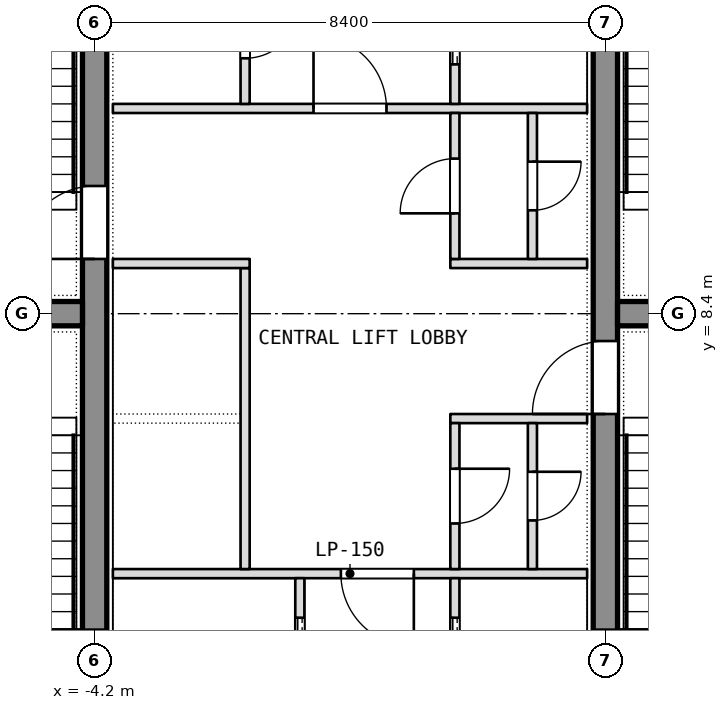
"""IFC4 building model, lengths in metres.
Left out: names, types, materials, properties, quantities, classifications, styles, units other than length and angle.
Written with IfcOpenShell. Run it as: python <this file> out.ifc"""

import sys

from ifc_helpers import new_model, si_unit, direction, frame, frame_2d, origin, place, context, subcontext, project, spatial, rectangle, extrude, element, fill, save


model = new_model("IFC4")
c1 = context("Model", 3, precision=1e-05, world=origin(), true_north=direction((0.0, 1.0)))
c2 = subcontext(c1, "Body", "Model", "MODEL_VIEW")
j1 = project(units=[si_unit("LENGTHUNIT", "METRE"), si_unit("PLANEANGLEUNIT", "RADIAN")], contexts=[c1])
p1 = place(None, origin())
s1 = spatial("IfcSite", under=j1, at=p1, CompositionType="ELEMENT")
p2 = place(p1, origin())
s2 = spatial("IfcBuilding", under=s1, at=p2, CompositionType="ELEMENT")
p3 = place(p2, frame((0.0, 0.0, 198.5)))
s3 = spatial("IfcBuildingStorey", under=s2, at=p3, CompositionType="ELEMENT", Elevation=198.5)
p4 = place(p3, frame((-4.2, 0.8, 0.0), z_axis=(0.0, 0.0, 1.0), x_axis=(0.0, 1.0, 0.0)))
e1 = element("IfcWall", 1, at=p4, inside=s3, PredefinedType="SHEAR", context=c2, shape_type="SweptSolid", body=[
    extrude(rectangle(XDim=15.2, YDim=0.4, at=frame_2d((7.6, 0.0))), origin(), (0.0, 0.0, 1.0), 3.6),
])
p5 = place(p4, frame((8.5, 0.0, 0.0)))
e2 = element("IfcOpeningElement", 2, at=p5, cuts=e1, PredefinedType="OPENING", context=c2, shape_type="SweptSolid", body=[
    extrude(rectangle(XDim=1.2, YDim=2.1, at=frame_2d((0.6, 1.05))), frame((0.0, 0.2, 0.0), z_axis=(0.0, -1.0, 0.0), x_axis=(1.0, 0.0, 0.0)), (0.0, 0.0, 1.0), 0.4),
])
p6 = place(p3, frame((4.2, 0.8, 0.0), z_axis=(0.0, 0.0, 1.0), x_axis=(0.0, 1.0, 0.0)))
e3 = element("IfcWall", 3, at=p6, inside=s3, PredefinedType="SHEAR", context=c2, shape_type="SweptSolid", body=[
    extrude(rectangle(XDim=15.2, YDim=0.4, at=frame_2d((7.6, 0.0))), origin(), (0.0, 0.0, 1.0), 3.6),
])
p7 = place(p6, frame((5.95, 0.0, 0.0)))
e4 = element("IfcOpeningElement", 4, at=p7, cuts=e3, PredefinedType="OPENING", context=c2, shape_type="SweptSolid", body=[
    extrude(rectangle(XDim=1.2, YDim=2.1, at=frame_2d((0.6, 1.05))), frame((0.0, 0.2, 0.0), z_axis=(0.0, -1.0, 0.0), x_axis=(1.0, 0.0, 0.0)), (0.0, 0.0, 1.0), 0.4),
])
for number, where, z_axis, x_axis in (
    (5, (-11.1, 8.4, 0.0), (0.0, 0.0, 1.0), (1.0, 0.0, 0.0)),
    (6, (4.4, 8.4, 0.0), (0.0, 0.0, 1.0), (1.0, 0.0, 0.0)),
):
    element("IfcWall", number, at=place(p3, frame(where, z_axis=z_axis, x_axis=x_axis)), inside=s3, PredefinedType="SHEAR", context=c2, shape_type="SweptSolid", body=[
        extrude(rectangle(XDim=6.7, YDim=0.4, at=frame_2d((3.35, 0.0))), origin(), (0.0, 0.0, 1.0), 3.6),
    ])
p8 = place(p3, frame((-3.9, 4.125, 0.0), z_axis=(0.0, 0.0, 1.0), x_axis=(1.0, 0.0, 0.0)))
e7 = element("IfcWall", 7, at=p8, inside=s3, PredefinedType="PARTITIONING", context=c2, shape_type="SweptSolid", body=[
    extrude(rectangle(XDim=7.8, YDim=0.15, at=frame_2d((3.9, 0.0))), origin(), (0.0, 0.0, 1.0), 3.34),
])
p9 = place(p8, frame((3.75, 0.0, 0.0)))
e8 = element("IfcOpeningElement", 8, at=p9, cuts=e7, PredefinedType="OPENING", context=c2, shape_type="SweptSolid", body=[
    extrude(rectangle(XDim=1.2, YDim=2.1, at=frame_2d((0.6, 1.05))), frame((0.0, 0.075, 0.0), z_axis=(0.0, -1.0, 0.0), x_axis=(1.0, 0.0, 0.0)), (0.0, 0.0, 1.0), 0.15),
])
p10 = place(p3, frame((-3.9, 11.775, 0.0), z_axis=(0.0, 0.0, 1.0), x_axis=(1.0, 0.0, 0.0)))
e9 = element("IfcWall", 9, at=p10, inside=s3, PredefinedType="PARTITIONING", context=c2, shape_type="SweptSolid", body=[
    extrude(rectangle(XDim=7.8, YDim=0.15, at=frame_2d((3.9, 0.0))), origin(), (0.0, 0.0, 1.0), 3.34),
])
p11 = place(p10, frame((3.3, 0.0, 0.0)))
e10 = element("IfcOpeningElement", 10, at=p11, cuts=e9, PredefinedType="OPENING", context=c2, shape_type="SweptSolid", body=[
    extrude(rectangle(XDim=1.2, YDim=2.1, at=frame_2d((0.6, 1.05))), frame((0.0, 0.075, 0.0), z_axis=(0.0, -1.0, 0.0), x_axis=(1.0, 0.0, 0.0)), (0.0, 0.0, 1.0), 0.15),
])
p12 = place(p3, frame((-0.825, 1.5, 0.0), z_axis=(0.0, 0.0, 1.0), x_axis=(0.0, 1.0, 0.0)))
e11 = element("IfcWall", 11, at=p12, inside=s3, PredefinedType="SHEAR", context=c2, shape_type="SweptSolid", body=[
    extrude(rectangle(XDim=2.55, YDim=0.15, at=frame_2d((1.275, 0.0))), origin(), (0.0, 0.0, 1.0), 3.6),
])
p13 = place(p12, frame((0.8, 0.0, 0.0)))
e12 = element("IfcOpeningElement", 12, at=p13, cuts=e11, PredefinedType="OPENING", context=c2, shape_type="SweptSolid", body=[
    extrude(rectangle(XDim=1.1, YDim=2.1, at=frame_2d((0.55, 1.05))), frame((0.0, 0.075, 0.0), z_axis=(0.0, -1.0, 0.0), x_axis=(1.0, 0.0, 0.0)), (0.0, 0.0, 1.0), 0.15),
])
p14 = place(p3, frame((-1.725, 4.2, 0.0), z_axis=(0.0, 0.0, 1.0), x_axis=(0.0, 1.0, 0.0)))
e13 = element("IfcWall", 13, at=p14, inside=s3, PredefinedType="SHEAR", context=c2, shape_type="SweptSolid", body=[
    extrude(rectangle(XDim=4.95, YDim=0.15, at=frame_2d((2.475, 0.0))), origin(), (0.0, 0.0, 1.0), 3.6),
])
p15 = place(p3, frame((-3.9, 9.225, 0.0), z_axis=(0.0, 0.0, 1.0), x_axis=(1.0, 0.0, 0.0)))
e14 = element("IfcWall", 14, at=p15, inside=s3, PredefinedType="SHEAR", context=c2, shape_type="SweptSolid", body=[
    extrude(rectangle(XDim=2.25, YDim=0.15, at=frame_2d((1.125, 0.0))), origin(), (0.0, 0.0, 1.0), 3.6),
])
p16 = place(p3, frame((-1.725, 11.85, 0.0), z_axis=(0.0, 0.0, 1.0), x_axis=(0.0, 1.0, 0.0)))
e15 = element("IfcWall", 15, at=p16, inside=s3, PredefinedType="PARTITIONING", context=c2, shape_type="SweptSolid", body=[
    extrude(rectangle(XDim=2.4, YDim=0.15, at=frame_2d((1.2, 0.0))), origin(), (0.0, 0.0, 1.0), 3.34),
])
p17 = place(p16, frame((0.75, 0.0, 0.0)))
e16 = element("IfcOpeningElement", 16, at=p17, cuts=e15, PredefinedType="OPENING", context=c2, shape_type="SweptSolid", body=[
    extrude(rectangle(XDim=0.9, YDim=2.1, at=frame_2d((0.45, 1.05))), frame((0.0, 0.075, 0.0), z_axis=(0.0, -1.0, 0.0), x_axis=(1.0, 0.0, 0.0)), (0.0, 0.0, 1.0), 0.15),
])
p18 = place(p3, frame((1.725, 1.65, 0.0), z_axis=(0.0, 0.0, 1.0), x_axis=(0.0, 1.0, 0.0)))
e17 = element("IfcWall", 17, at=p18, inside=s3, PredefinedType="SHEAR", context=c2, shape_type="SweptSolid", body=[
    extrude(rectangle(XDim=2.4, YDim=0.15, at=frame_2d((1.2, 0.0))), origin(), (0.0, 0.0, 1.0), 3.6),
])
p19 = place(p18, frame((0.65, 0.0, 0.0)))
e18 = element("IfcOpeningElement", 18, at=p19, cuts=e17, PredefinedType="OPENING", context=c2, shape_type="SweptSolid", body=[
    extrude(rectangle(XDim=1.1, YDim=2.1, at=frame_2d((0.55, 1.05))), frame((0.0, 0.075, 0.0), z_axis=(0.0, -1.0, 0.0), x_axis=(1.0, 0.0, 0.0)), (0.0, 0.0, 1.0), 0.15),
])
p20 = place(p3, frame((1.725, 11.85, 0.0), z_axis=(0.0, 0.0, 1.0), x_axis=(0.0, 1.0, 0.0)))
e19 = element("IfcWall", 19, at=p20, inside=s3, PredefinedType="SHEAR", context=c2, shape_type="SweptSolid", body=[
    extrude(rectangle(XDim=2.4, YDim=0.15, at=frame_2d((1.2, 0.0))), origin(), (0.0, 0.0, 1.0), 3.6),
])
p21 = place(p20, frame((0.65, 0.0, 0.0)))
e20 = element("IfcOpeningElement", 20, at=p21, cuts=e19, PredefinedType="OPENING", context=c2, shape_type="SweptSolid", body=[
    extrude(rectangle(XDim=1.1, YDim=2.1, at=frame_2d((0.55, 1.05))), frame((0.0, 0.075, 0.0), z_axis=(0.0, -1.0, 0.0), x_axis=(1.0, 0.0, 0.0)), (0.0, 0.0, 1.0), 0.15),
])
for number, where, z_axis, x_axis in (
    (21, (1.65, 6.675, 0.0), (0.0, 0.0, 1.0), (1.0, 0.0, 0.0)),
    (22, (1.65, 9.225, 0.0), (0.0, 0.0, 1.0), (1.0, 0.0, 0.0)),
):
    element("IfcWall", number, at=place(p3, frame(where, z_axis=z_axis, x_axis=x_axis)), inside=s3, PredefinedType="PARTITIONING", context=c2, shape_type="SweptSolid", body=[
        extrude(rectangle(XDim=2.25, YDim=0.15, at=frame_2d((1.125, 0.0))), origin(), (0.0, 0.0, 1.0), 3.34),
    ])
p22 = place(p3, frame((1.725, 4.2, 0.0), z_axis=(0.0, 0.0, 1.0), x_axis=(0.0, 1.0, 0.0)))
e23 = element("IfcWall", 23, at=p22, inside=s3, PredefinedType="PARTITIONING", context=c2, shape_type="SweptSolid", body=[
    extrude(rectangle(XDim=2.4, YDim=0.15, at=frame_2d((1.2, 0.0))), origin(), (0.0, 0.0, 1.0), 3.34),
])
p23 = place(p22, frame((0.75, 0.0, 0.0)))
e24 = element("IfcOpeningElement", 24, at=p23, cuts=e23, PredefinedType="OPENING", context=c2, shape_type="SweptSolid", body=[
    extrude(rectangle(XDim=0.9, YDim=2.1, at=frame_2d((0.45, 1.05))), frame((0.0, 0.075, 0.0), z_axis=(0.0, -1.0, 0.0), x_axis=(1.0, 0.0, 0.0)), (0.0, 0.0, 1.0), 0.15),
])
p24 = place(p3, frame((1.725, 9.3, 0.0), z_axis=(0.0, 0.0, 1.0), x_axis=(0.0, 1.0, 0.0)))
e25 = element("IfcWall", 25, at=p24, inside=s3, PredefinedType="PARTITIONING", context=c2, shape_type="SweptSolid", body=[
    extrude(rectangle(XDim=2.4, YDim=0.15, at=frame_2d((1.2, 0.0))), origin(), (0.0, 0.0, 1.0), 3.34),
])
p25 = place(p24, frame((0.75, 0.0, 0.0)))
e26 = element("IfcOpeningElement", 26, at=p25, cuts=e25, PredefinedType="OPENING", context=c2, shape_type="SweptSolid", body=[
    extrude(rectangle(XDim=0.9, YDim=2.1, at=frame_2d((0.45, 1.05))), frame((0.0, 0.075, 0.0), z_axis=(0.0, -1.0, 0.0), x_axis=(1.0, 0.0, 0.0)), (0.0, 0.0, 1.0), 0.15),
])
p26 = place(p3, frame((3.0, 4.2, 0.0), z_axis=(0.0, 0.0, 1.0), x_axis=(0.0, 1.0, 0.0)))
e27 = element("IfcWall", 27, at=p26, inside=s3, PredefinedType="PARTITIONING", context=c2, shape_type="SweptSolid", body=[
    extrude(rectangle(XDim=2.4, YDim=0.15, at=frame_2d((1.2, 0.0))), origin(), (0.0, 0.0, 1.0), 3.34),
])
p27 = place(p26, frame((0.8, 0.0, 0.0)))
e28 = element("IfcOpeningElement", 28, at=p27, cuts=e27, PredefinedType="OPENING", context=c2, shape_type="SweptSolid", body=[
    extrude(rectangle(XDim=0.8, YDim=2.1, at=frame_2d((0.4, 1.05))), frame((0.0, 0.075, 0.0), z_axis=(0.0, -1.0, 0.0), x_axis=(1.0, 0.0, 0.0)), (0.0, 0.0, 1.0), 0.15),
])
p28 = place(p3, frame((3.0, 9.3, 0.0), z_axis=(0.0, 0.0, 1.0), x_axis=(0.0, 1.0, 0.0)))
e29 = element("IfcWall", 29, at=p28, inside=s3, PredefinedType="PARTITIONING", context=c2, shape_type="SweptSolid", body=[
    extrude(rectangle(XDim=2.4, YDim=0.15, at=frame_2d((1.2, 0.0))), origin(), (0.0, 0.0, 1.0), 3.34),
])
p29 = place(p28, frame((0.8, 0.0, 0.0)))
e30 = element("IfcOpeningElement", 30, at=p29, cuts=e29, PredefinedType="OPENING", context=c2, shape_type="SweptSolid", body=[
    extrude(rectangle(XDim=0.8, YDim=2.1, at=frame_2d((0.4, 1.05))), frame((0.0, 0.075, 0.0), z_axis=(0.0, -1.0, 0.0), x_axis=(1.0, 0.0, 0.0)), (0.0, 0.0, 1.0), 0.15),
])
p30 = place(p23, origin())
e31 = element("IfcDoor", 31, at=p30, inside=s3, OperationType="SINGLE_SWING_LEFT", PredefinedType="DOOR", context=c2, shape_type="SweptSolid", body=[
    extrude(rectangle(XDim=0.9, YDim=2.1, at=frame_2d((0.45, 1.05))), frame((0.0, 0.025, 0.0), z_axis=(0.0, -1.0, 0.0), x_axis=(1.0, 0.0, 0.0)), (0.0, 0.0, 1.0), 0.05),
])
fill(e24, e31)
p31 = place(p27, origin())
e32 = element("IfcDoor", 32, at=p31, inside=s3, OperationType="SINGLE_SWING_LEFT", PredefinedType="DOOR", context=c2, shape_type="SweptSolid", body=[
    extrude(rectangle(XDim=0.8, YDim=2.1, at=frame_2d((0.4, 1.05))), frame((0.0, 0.025, 0.0), z_axis=(0.0, -1.0, 0.0), x_axis=(1.0, 0.0, 0.0)), (0.0, 0.0, 1.0), 0.05),
])
fill(e28, e32)
p32 = place(p25, origin())
e33 = element("IfcDoor", 33, at=p32, inside=s3, OperationType="SINGLE_SWING_LEFT", PredefinedType="DOOR", context=c2, shape_type="SweptSolid", body=[
    extrude(rectangle(XDim=0.9, YDim=2.1, at=frame_2d((0.45, 1.05))), frame((0.0, 0.025, 0.0), z_axis=(0.0, -1.0, 0.0), x_axis=(1.0, 0.0, 0.0)), (0.0, 0.0, 1.0), 0.05),
])
fill(e26, e33)
p33 = place(p29, origin())
e34 = element("IfcDoor", 34, at=p33, inside=s3, OperationType="SINGLE_SWING_LEFT", PredefinedType="DOOR", context=c2, shape_type="SweptSolid", body=[
    extrude(rectangle(XDim=0.8, YDim=2.1, at=frame_2d((0.4, 1.05))), frame((0.0, 0.025, 0.0), z_axis=(0.0, -1.0, 0.0), x_axis=(1.0, 0.0, 0.0)), (0.0, 0.0, 1.0), 0.05),
])
fill(e30, e34)
p34 = place(p13, origin())
e35 = element("IfcDoor", 35, at=p34, inside=s3, OperationType="SLIDING_TO_LEFT", PredefinedType="DOOR", context=c2, shape_type="SweptSolid", body=[
    extrude(rectangle(XDim=1.1, YDim=2.1, at=frame_2d((0.55, 1.05))), frame((0.0, 0.025, 0.0), z_axis=(0.0, -1.0, 0.0), x_axis=(1.0, 0.0, 0.0)), (0.0, 0.0, 1.0), 0.05),
])
fill(e12, e35)
p35 = place(p19, origin())
e36 = element("IfcDoor", 36, at=p35, inside=s3, OperationType="SLIDING_TO_LEFT", PredefinedType="DOOR", context=c2, shape_type="SweptSolid", body=[
    extrude(rectangle(XDim=1.1, YDim=2.1, at=frame_2d((0.55, 1.05))), frame((0.0, 0.025, 0.0), z_axis=(0.0, -1.0, 0.0), x_axis=(1.0, 0.0, 0.0)), (0.0, 0.0, 1.0), 0.05),
])
fill(e18, e36)
p36 = place(p21, origin())
e37 = element("IfcDoor", 37, at=p36, inside=s3, OperationType="SLIDING_TO_LEFT", PredefinedType="DOOR", context=c2, shape_type="SweptSolid", body=[
    extrude(rectangle(XDim=1.1, YDim=2.1, at=frame_2d((0.55, 1.05))), frame((0.0, 0.025, 0.0), z_axis=(0.0, -1.0, 0.0), x_axis=(1.0, 0.0, 0.0)), (0.0, 0.0, 1.0), 0.05),
])
fill(e20, e37)
p37 = place(p9, origin())
e38 = element("IfcDoor", 38, at=p37, inside=s3, OperationType="SINGLE_SWING_LEFT", PredefinedType="DOOR", context=c2, shape_type="SweptSolid", body=[
    extrude(rectangle(XDim=1.2, YDim=2.1, at=frame_2d((0.6, 1.05))), frame((0.0, 0.025, 0.0), z_axis=(0.0, -1.0, 0.0), x_axis=(1.0, 0.0, 0.0)), (0.0, 0.0, 1.0), 0.05),
])
fill(e8, e38)
p38 = place(p11, origin())
e39 = element("IfcDoor", 39, at=p38, inside=s3, OperationType="SINGLE_SWING_LEFT", PredefinedType="DOOR", context=c2, shape_type="SweptSolid", body=[
    extrude(rectangle(XDim=1.2, YDim=2.1, at=frame_2d((0.6, 1.05))), frame((0.0, 0.025, 0.0), z_axis=(0.0, -1.0, 0.0), x_axis=(1.0, 0.0, 0.0)), (0.0, 0.0, 1.0), 0.05),
])
fill(e10, e39)
p39 = place(p17, origin())
e40 = element("IfcDoor", 40, at=p39, inside=s3, OperationType="SINGLE_SWING_LEFT", PredefinedType="DOOR", context=c2, shape_type="SweptSolid", body=[
    extrude(rectangle(XDim=0.9, YDim=2.1, at=frame_2d((0.45, 1.05))), frame((0.0, 0.025, 0.0), z_axis=(0.0, -1.0, 0.0), x_axis=(1.0, 0.0, 0.0)), (0.0, 0.0, 1.0), 0.05),
])
fill(e16, e40)
p40 = place(p5, origin())
e41 = element("IfcDoor", 41, at=p40, inside=s3, OperationType="SINGLE_SWING_LEFT", PredefinedType="DOOR", context=c2, shape_type="SweptSolid", body=[
    extrude(rectangle(XDim=1.2, YDim=2.1, at=frame_2d((0.6, 1.05))), frame((0.0, 0.025, 0.0), z_axis=(0.0, -1.0, 0.0), x_axis=(1.0, 0.0, 0.0)), (0.0, 0.0, 1.0), 0.05),
])
fill(e2, e41)
p41 = place(p7, origin())
e42 = element("IfcDoor", 42, at=p41, inside=s3, OperationType="SINGLE_SWING_LEFT", PredefinedType="DOOR", context=c2, shape_type="SweptSolid", body=[
    extrude(rectangle(XDim=1.2, YDim=2.1, at=frame_2d((0.6, 1.05))), frame((0.0, 0.025, 0.0), z_axis=(0.0, -1.0, 0.0), x_axis=(1.0, 0.0, 0.0)), (0.0, 0.0, 1.0), 0.05),
])
fill(e4, e42)
save(model, sys.argv[1])
